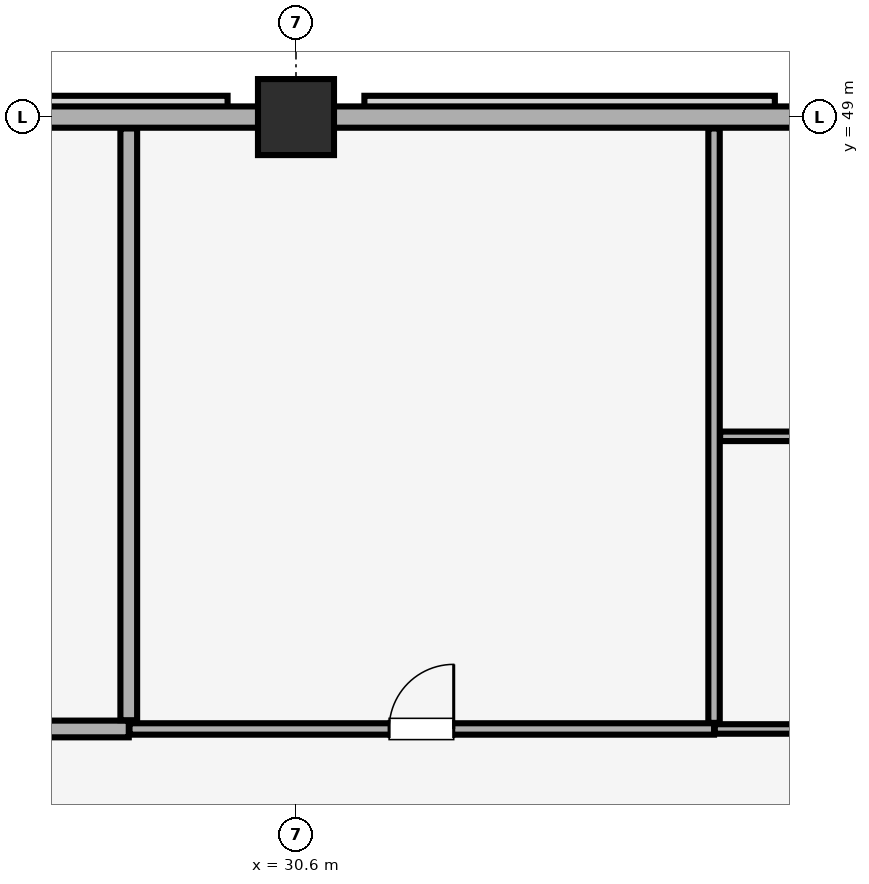
"""IFC4 building model, lengths in metres.
Left out: names, types, materials, properties, quantities, classifications, styles, units other than length and angle.
Written with IfcOpenShell. Run it as: python <this file> out.ifc"""

import sys

from ifc_helpers import new_model, si_unit, direction, frame, frame_2d, origin, origin_2d, place, context, subcontext, project, spatial, rectangle, extrude, element, fill, save


model = new_model("IFC4")
c1 = context("Model", 3, precision=1e-05, world=origin(), true_north=direction((0.0, 1.0)))
c2 = subcontext(c1, "Body", "Model", "MODEL_VIEW")
j1 = project(units=[si_unit("LENGTHUNIT", "METRE"), si_unit("PLANEANGLEUNIT", "RADIAN")], contexts=[c1])
p1 = place(None, origin())
s1 = spatial("IfcSite", under=j1, at=p1, CompositionType="ELEMENT")
p2 = place(p1, origin())
s2 = spatial("IfcBuilding", under=s1, at=p2, CompositionType="ELEMENT")
p3 = place(p2, frame((0.0, 0.0, 280.5)))
s3 = spatial("IfcBuildingStorey", under=s2, at=p3, CompositionType="ELEMENT", Elevation=280.5)
p4 = place(p3, frame((30.6, 49.0, 0.0), z_axis=(0.0, 0.0, 1.0), x_axis=(1.0, 0.0, 0.0)))
e1 = element("IfcColumn", 1, at=p4, inside=s3, PredefinedType="COLUMN", context=c2, shape_type="SweptSolid", body=[
    extrude(rectangle(XDim=1.0, YDim=1.0, at=origin_2d()), origin(), (0.0, 0.0, 1.0), 5.1),
])
p5 = place(p3, frame((74.2, 49.0, 0.0), z_axis=(0.0, 0.0, 1.0), x_axis=(-1.0, 0.0, 0.0)))
e2 = element("IfcWall", 2, at=p5, inside=s3, PredefinedType="SOLIDWALL", context=c2, shape_type="SweptSolid", body=[
    extrude(rectangle(XDim=64.4, YDim=0.28, at=frame_2d((32.2, 0.0))), origin(), (0.0, 0.0, 1.0), 4.0),
])
p6 = place(p3, frame((25.0, 40.95, 0.0), z_axis=(0.0, 0.0, 1.0), x_axis=(1.0, 0.0, 0.0)))
e3 = element("IfcWall", 3, at=p6, inside=s3, PredefinedType="PARTITIONING", context=c2, shape_type="SweptSolid", body=[
    extrude(rectangle(XDim=3.4, YDim=0.22, at=frame_2d((1.7, 0.0))), origin(), (0.0, 0.0, 1.0), 5.1),
])
p7 = place(p6, frame((1.275, 0.0, 0.0)))
e4 = element("IfcOpeningElement", 4, at=p7, cuts=e3, PredefinedType="OPENING", context=c2, shape_type="SweptSolid", body=[
    extrude(rectangle(XDim=0.85, YDim=2.1, at=frame_2d((0.425, 1.05))), frame((0.0, 0.12, 0.0), z_axis=(0.0, -1.0, 0.0), x_axis=(1.0, 0.0, 0.0)), (0.0, 0.0, 1.0), 0.24),
])
p8 = place(p3, frame((28.4, 41.065, 0.0), z_axis=(0.0, 0.0, 1.0), x_axis=(0.0, 1.0, 0.0)))
e5 = element("IfcWall", 5, at=p8, inside=s3, PredefinedType="PARTITIONING", context=c2, shape_type="SweptSolid", body=[
    extrude(rectangle(XDim=7.785, YDim=0.22, at=frame_2d((3.893, 0.0))), origin(), (0.0, 0.0, 1.0), 5.1),
])
p9 = place(p3, frame((28.41, 40.95, 0.0), z_axis=(0.0, 0.0, 1.0), x_axis=(1.0, 0.0, 0.0)))
e6 = element("IfcWall", 6, at=p9, inside=s3, PredefinedType="PARTITIONING", context=c2, shape_type="SweptSolid", body=[
    extrude(rectangle(XDim=7.69, YDim=0.15, at=frame_2d((3.845, 0.0))), origin(), (0.0, 0.0, 1.0), 5.1),
])
p10 = place(p9, frame((3.415, 0.0, 0.0)))
e7 = element("IfcOpeningElement", 7, at=p10, cuts=e6, PredefinedType="OPENING", context=c2, shape_type="SweptSolid", body=[
    extrude(rectangle(XDim=0.85, YDim=2.1, at=frame_2d((0.425, 1.05))), frame((0.0, 0.085, 0.0), z_axis=(0.0, -1.0, 0.0), x_axis=(1.0, 0.0, 0.0)), (0.0, 0.0, 1.0), 0.17),
])
p11 = place(p3, frame((36.1, 41.03, 0.0), z_axis=(0.0, 0.0, 1.0), x_axis=(0.0, 1.0, 0.0)))
e8 = element("IfcWall", 8, at=p11, inside=s3, PredefinedType="PARTITIONING", context=c2, shape_type="SweptSolid", body=[
    extrude(rectangle(XDim=7.82, YDim=0.15, at=frame_2d((3.91, 0.0))), origin(), (0.0, 0.0, 1.0), 5.1),
])
p12 = place(p3, frame((36.11, 40.95, 0.0), z_axis=(0.0, 0.0, 1.0), x_axis=(1.0, 0.0, 0.0)))
e9 = element("IfcWall", 9, at=p12, inside=s3, PredefinedType="PARTITIONING", context=c2, shape_type="SweptSolid", body=[
    extrude(rectangle(XDim=3.59, YDim=0.125, at=frame_2d((1.795, 0.0))), origin(), (0.0, 0.0, 1.0), 5.1),
])
p13 = place(p12, frame((1.34, 0.0, 0.0)))
e10 = element("IfcOpeningElement", 10, at=p13, cuts=e9, PredefinedType="OPENING", context=c2, shape_type="SweptSolid", body=[
    extrude(rectangle(XDim=0.9, YDim=2.1, at=frame_2d((0.45, 1.05))), frame((0.0, 0.073, 0.0), z_axis=(0.0, -1.0, 0.0), x_axis=(1.0, 0.0, 0.0)), (0.0, 0.0, 1.0), 0.145),
])
p14 = place(p3, frame((36.18, 44.8, 0.0), z_axis=(0.0, 0.0, 1.0), x_axis=(1.0, 0.0, 0.0)))
e11 = element("IfcWall", 11, at=p14, inside=s3, PredefinedType="PARTITIONING", context=c2, shape_type="SweptSolid", body=[
    extrude(rectangle(XDim=3.52, YDim=0.125, at=frame_2d((1.76, 0.0))), origin(), (0.0, 0.0, 1.0), 5.1),
])
p15 = place(p10, origin())
e12 = element("IfcDoor", 12, at=p15, inside=s3, OperationType="SINGLE_SWING_RIGHT", PredefinedType="DOOR", context=c2, shape_type="SweptSolid", body=[
    extrude(rectangle(XDim=0.85, YDim=2.1, at=frame_2d((0.425, 1.05))), frame((0.0, 0.025, 0.0), z_axis=(0.0, -1.0, 0.0), x_axis=(1.0, 0.0, 0.0)), (0.0, 0.0, 1.0), 0.05),
])
fill(e7, e12)
save(model, sys.argv[1])
